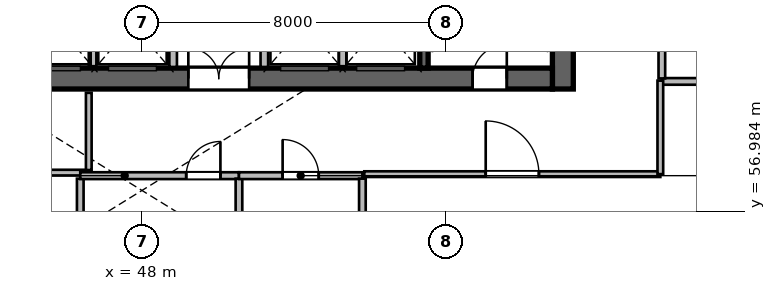
"""IFC4 building model, lengths in metres.
Left out: names, types, materials, properties, quantities, classifications, styles, units other than length and angle.
Written with IfcOpenShell. Run it as: python <this file> out.ifc"""

import sys

from ifc_helpers import new_model, si_unit, direction, frame, frame_2d, origin, place, context, subcontext, project, spatial, rectangle, extrude, source, transform, mapped, element, fill, save


model = new_model("IFC4")
c1 = context("Model", 3, precision=1e-05, world=origin(), true_north=direction((0.0, 1.0)))
c2 = subcontext(c1, "Body", "Model", "MODEL_VIEW")
j1 = project(units=[si_unit("LENGTHUNIT", "METRE"), si_unit("PLANEANGLEUNIT", "RADIAN")], contexts=[c1])
p1 = place(None, origin())
s1 = spatial("IfcSite", under=j1, at=p1, CompositionType="ELEMENT")
p2 = place(p1, origin())
s2 = spatial("IfcBuilding", under=s1, at=p2, CompositionType="ELEMENT")
p3 = place(p2, frame((0.0, 0.0, 30.0)))
s3 = spatial("IfcBuildingStorey", under=s2, at=p3, CompositionType="ELEMENT", Elevation=30.0)
m1 = source(origin(), c2, "Body", "SweptSolid", [
    extrude(rectangle(XDim=12.0, YDim=0.55, at=frame_2d((6.0, 0.0))), origin(), (0.0, 0.0, 1.0), 5.4),
])
p4 = place(p3, frame((59.075, 60.2, 0.0), z_axis=(0.0, 0.0, 1.0), x_axis=(0.0, 1.0, 0.0)))
e1 = element("IfcWall", 1, at=p4, inside=s3, PredefinedType="SHEAR", context=c2, shape_type="MappedRepresentation", body=[
    mapped(m1, transform((0.0, 0.0, 0.0), scale=1.0)),
])
m2 = source(origin(), c2, "Body", "SweptSolid", [
    extrude(rectangle(XDim=21.6, YDim=0.55, at=frame_2d((10.8, 0.0))), origin(), (0.0, 0.0, 1.0), 5.4),
])
p5 = place(p3, frame((37.2, 60.475, 0.0), z_axis=(0.0, 0.0, 1.0), x_axis=(1.0, 0.0, 0.0)))
e2 = element("IfcWall", 2, at=p5, inside=s3, PredefinedType="SHEAR", context=c2, shape_type="MappedRepresentation", body=[
    mapped(m2, transform((0.0, 0.0, 0.0), scale=1.0)),
])
p6 = place(p5, frame((1.1, 0.0, 0.0)))
e3 = element("IfcOpeningElement", 3, at=p6, cuts=e2, PredefinedType="OPENING", context=c2, shape_type="SweptSolid", body=[
    extrude(rectangle(XDim=1.15, YDim=2.15, at=frame_2d((0.575, 1.075))), frame((0.0, 0.285, 0.0), z_axis=(0.0, -1.0, 0.0), x_axis=(1.0, 0.0, 0.0)), (0.0, 0.0, 1.0), 0.57),
])
p7 = place(p5, frame((19.5, 0.0, 0.0)))
e4 = element("IfcOpeningElement", 4, at=p7, cuts=e2, PredefinedType="OPENING", context=c2, shape_type="SweptSolid", body=[
    extrude(rectangle(XDim=0.9, YDim=2.1, at=frame_2d((0.45, 1.05))), frame((0.0, 0.285, 0.0), z_axis=(0.0, -1.0, 0.0), x_axis=(1.0, 0.0, 0.0)), (0.0, 0.0, 1.0), 0.57),
])
p8 = place(p5, frame((12.02, 0.0, 0.0)))
e5 = element("IfcOpeningElement", 5, at=p8, cuts=e2, PredefinedType="OPENING", context=c2, shape_type="SweptSolid", body=[
    extrude(rectangle(XDim=1.6, YDim=2.15, at=frame_2d((0.8, 1.075))), frame((0.0, 0.285, 0.0), z_axis=(0.0, -1.0, 0.0), x_axis=(1.0, 0.0, 0.0)), (0.0, 0.0, 1.0), 0.57),
])
m3 = source(origin(), c2, "Body", "SweptSolid", [
    extrude(rectangle(XDim=10.9, YDim=0.22, at=frame_2d((5.45, 0.0))), origin(), (0.0, 0.0, 1.0), 5.4),
])
p9 = place(p3, frame((55.42, 60.75, 0.0), z_axis=(0.0, 0.0, 1.0), x_axis=(0.0, 1.0, 0.0)))
e6 = element("IfcWall", 6, at=p9, inside=s3, PredefinedType="SHEAR", context=c2, shape_type="MappedRepresentation", body=[
    mapped(m3, transform((0.0, 0.0, 0.0), scale=1.0)),
])
p10 = place(p9, frame((9.495, 0.0, 0.0)))
e7 = element("IfcOpeningElement", 7, at=p10, cuts=e6, PredefinedType="OPENING", context=c2, shape_type="SweptSolid", body=[
    extrude(rectangle(XDim=1.15, YDim=2.15, at=frame_2d((0.575, 1.075))), frame((0.0, 0.12, 0.0), z_axis=(0.0, -1.0, 0.0), x_axis=(1.0, 0.0, 0.0)), (0.0, 0.0, 1.0), 0.24),
])
m4 = source(origin(), c2, "Body", "SweptSolid", [
    extrude(rectangle(XDim=2.24, YDim=0.2, at=frame_2d((1.12, 0.0))), origin(), (0.0, 0.0, 1.0), 5.16),
])
for number, where, z_axis, x_axis in (
    (8, (48.82, 60.78, 0.0), (0.0, 0.0, 1.0), (0.0, 1.0, 0.0)),
    (9, (51.22, 60.78, 0.0), (0.0, 0.0, 1.0), (0.0, 1.0, 0.0)),
):
    element("IfcWall", number, at=place(p3, frame(where, z_axis=z_axis, x_axis=x_axis)), inside=s3, PredefinedType="SOLIDWALL", context=c2, shape_type="MappedRepresentation", body=[
        mapped(m4, transform((0.0, 0.0, 0.0), scale=1.0)),
    ])
m5 = source(origin(), c2, "Body", "SweptSolid", [
    extrude(rectangle(XDim=2.2, YDim=0.2, at=frame_2d((1.1, 0.0))), origin(), (0.0, 0.0, 1.0), 5.16),
])
for number, where, z_axis, x_axis in (
    (10, (46.7, 60.8, 0.0), (0.0, 0.0, 1.0), (0.0, 1.0, 0.0)),
    (11, (53.28, 60.8, 0.0), (0.0, 0.0, 1.0), (0.0, 1.0, 0.0)),
):
    element("IfcWall", number, at=place(p3, frame(where, z_axis=z_axis, x_axis=x_axis)), inside=s3, PredefinedType="SOLIDWALL", context=c2, shape_type="MappedRepresentation", body=[
        mapped(m5, transform((0.0, 0.0, 0.0), scale=1.0)),
    ])
m6 = source(origin(), c2, "Body", "SweptSolid", [
    extrude(rectangle(XDim=5.4, YDim=0.15, at=frame_2d((2.7, 0.0))), origin(), (0.0, 0.0, 1.0), 4.591),
])
p11 = place(p3, frame((41.2, 58.0, 0.0), z_axis=(0.0, 0.0, 1.0), x_axis=(1.0, 0.0, 0.0)))
e12 = element("IfcWall", 12, at=p11, inside=s3, PredefinedType="PARTITIONING", context=c2, shape_type="MappedRepresentation", body=[
    mapped(m6, transform((0.0, 0.0, 0.0), scale=1.0)),
])
p12 = place(p11, frame((2.25, 0.0, 0.0)))
e13 = element("IfcOpeningElement", 13, at=p12, cuts=e12, PredefinedType="OPENING", context=c2, shape_type="SweptSolid", body=[
    extrude(rectangle(XDim=0.9, YDim=2.08, at=frame_2d((0.45, 1.04))), frame((0.0, 0.085, 0.0), z_axis=(0.0, -1.0, 0.0), x_axis=(1.0, 0.0, 0.0)), (0.0, 0.0, 1.0), 0.17),
])
m7 = source(origin(), c2, "Body", "SweptSolid", [
    extrude(rectangle(XDim=2.033, YDim=0.15, at=frame_2d((1.016, 0.0))), origin(), (0.0, 0.0, 1.0), 5.16),
])
p13 = place(p3, frame((46.6, 58.067, 0.0), z_axis=(0.0, 0.0, 1.0), x_axis=(0.0, 1.0, 0.0)))
e14 = element("IfcWall", 14, at=p13, inside=s3, PredefinedType="PARTITIONING", context=c2, shape_type="MappedRepresentation", body=[
    mapped(m7, transform((0.0, 0.0, 0.0), scale=1.0)),
])
m8 = source(origin(), c2, "Body", "SweptSolid", [
    extrude(rectangle(XDim=3.763, YDim=0.175, at=frame_2d((1.881, 0.0))), origin(), (0.0, 0.0, 1.0), 5.16),
])
p14 = place(p3, frame((46.376, 54.079, 0.0), z_axis=(0.0, 0.0, 1.0), x_axis=(0.0, 1.0, 0.0)))
e15 = element("IfcWall", 15, at=p14, inside=s3, PredefinedType="PARTITIONING", context=c2, shape_type="MappedRepresentation", body=[
    mapped(m8, transform((0.0, 0.0, 0.0), scale=1.0)),
])
m9 = source(origin(), c2, "Body", "SweptSolid", [
    extrude(rectangle(XDim=4.176, YDim=0.18, at=frame_2d((2.088, 0.0))), origin(), (0.0, 0.0, 1.0), 5.16),
])
p15 = place(p3, frame((46.376, 57.92, 0.0), z_axis=(0.0, 0.0, 1.0), x_axis=(1.0, 0.0, 0.0)))
e16 = element("IfcWall", 16, at=p15, inside=s3, PredefinedType="PLUMBINGWALL", context=c2, shape_type="MappedRepresentation", body=[
    mapped(m9, transform((0.0, 0.0, 0.0), scale=1.0)),
])
p16 = place(p15, frame((2.788, 0.0, 0.0)))
e17 = element("IfcOpeningElement", 17, at=p16, cuts=e16, PredefinedType="OPENING", context=c2, shape_type="SweptSolid", body=[
    extrude(rectangle(XDim=0.9, YDim=2.08, at=frame_2d((0.45, 1.04))), frame((0.0, 0.1, 0.0), z_axis=(0.0, -1.0, 0.0), x_axis=(1.0, 0.0, 0.0)), (0.0, 0.0, 1.0), 0.2),
])
p17 = place(p3, frame((50.552, 54.079, 0.0), z_axis=(0.0, 0.0, 1.0), x_axis=(0.0, 1.0, 0.0)))
e18 = element("IfcWall", 18, at=p17, inside=s3, PredefinedType="PARTITIONING", context=c2, shape_type="MappedRepresentation", body=[
    mapped(m8, transform((0.0, 0.0, 0.0), scale=1.0)),
])
m10 = source(origin(), c2, "Body", "SweptSolid", [
    extrude(rectangle(XDim=3.248, YDim=0.18, at=frame_2d((1.624, 0.0))), origin(), (0.0, 0.0, 1.0), 5.16),
])
p18 = place(p3, frame((50.552, 57.92, 0.0), z_axis=(0.0, 0.0, 1.0), x_axis=(1.0, 0.0, 0.0)))
e19 = element("IfcWall", 19, at=p18, inside=s3, PredefinedType="PLUMBINGWALL", context=c2, shape_type="MappedRepresentation", body=[
    mapped(m10, transform((0.0, 0.0, 0.0), scale=1.0)),
])
p19 = place(p18, frame((1.149, 0.0, 0.0)))
e20 = element("IfcOpeningElement", 20, at=p19, cuts=e19, PredefinedType="OPENING", context=c2, shape_type="SweptSolid", body=[
    extrude(rectangle(XDim=0.95, YDim=2.12, at=frame_2d((0.475, 1.06))), frame((0.0, 0.1, 0.0), z_axis=(0.0, -1.0, 0.0), x_axis=(1.0, 0.0, 0.0)), (0.0, 0.0, 1.0), 0.2),
])
p20 = place(p3, frame((53.8, 54.079, 0.0), z_axis=(0.0, 0.0, 1.0), x_axis=(0.0, 1.0, 0.0)))
e21 = element("IfcWall", 21, at=p20, inside=s3, PredefinedType="PARTITIONING", context=c2, shape_type="MappedRepresentation", body=[
    mapped(m8, transform((0.0, 0.0, 0.0), scale=1.0)),
])
m11 = source(origin(), c2, "Body", "SweptSolid", [
    extrude(rectangle(XDim=9.82, YDim=0.175, at=frame_2d((4.91, 0.0))), origin(), (0.0, 0.0, 1.0), 5.16),
])
p21 = place(p3, frame((61.68, 60.4, 0.0), z_axis=(0.0, 0.0, 1.0), x_axis=(1.0, 0.0, 0.0)))
e22 = element("IfcWall", 22, at=p21, inside=s3, PredefinedType="PARTITIONING", context=c2, shape_type="MappedRepresentation", body=[
    mapped(m11, transform((0.0, 0.0, 0.0), scale=1.0)),
])
m12 = source(origin(), c2, "Body", "SweptSolid", [
    extrude(rectangle(XDim=7.443, YDim=0.175, at=frame_2d((3.721, 0.0))), origin(), (0.0, 0.0, 1.0), 5.16),
])
p22 = place(p3, frame((61.68, 60.479, 0.0), z_axis=(0.0, 0.0, 1.0), x_axis=(0.0, 1.0, 0.0)))
e23 = element("IfcWall", 23, at=p22, inside=s3, PredefinedType="PARTITIONING", context=c2, shape_type="MappedRepresentation", body=[
    mapped(m12, transform((0.0, 0.0, 0.0), scale=1.0)),
])
p23 = place(p22, frame((3.121, 0.0, 0.0)))
e24 = element("IfcOpeningElement", 24, at=p23, cuts=e23, PredefinedType="OPENING", context=c2, shape_type="SweptSolid", body=[
    extrude(rectangle(XDim=1.2, YDim=2.15, at=frame_2d((0.6, 1.075))), frame((0.0, 0.098, 0.0), z_axis=(0.0, -1.0, 0.0), x_axis=(1.0, 0.0, 0.0)), (0.0, 0.0, 1.0), 0.195),
])
m13 = source(origin(), c2, "Body", "SweptSolid", [
    extrude(rectangle(XDim=7.79, YDim=0.15, at=frame_2d((3.895, 0.0))), origin(), (0.0, 0.0, 1.0), 4.591),
])
p24 = place(p3, frame((53.85, 57.96, 0.0), z_axis=(0.0, 0.0, 1.0), x_axis=(1.0, 0.0, 0.0)))
e25 = element("IfcWall", 25, at=p24, inside=s3, PredefinedType="PARTITIONING", context=c2, shape_type="MappedRepresentation", body=[
    mapped(m13, transform((0.0, 0.0, 0.0), scale=1.0)),
])
p25 = place(p24, frame((3.195, 0.0, 0.0)))
e26 = element("IfcOpeningElement", 26, at=p25, cuts=e25, PredefinedType="OPENING", context=c2, shape_type="SweptSolid", body=[
    extrude(rectangle(XDim=1.4, YDim=2.15, at=frame_2d((0.7, 1.075))), frame((0.0, 0.085, 0.0), z_axis=(0.0, -1.0, 0.0), x_axis=(1.0, 0.0, 0.0)), (0.0, 0.0, 1.0), 0.17),
])
m14 = source(origin(), c2, "Body", "SweptSolid", [
    extrude(rectangle(XDim=2.46, YDim=0.15, at=frame_2d((1.23, 0.0))), origin(), (0.0, 0.0, 1.0), 5.16),
])
p26 = place(p3, frame((61.64, 57.96, 0.0), z_axis=(0.0, 0.0, 1.0), x_axis=(0.0, 1.0, 0.0)))
e27 = element("IfcWall", 27, at=p26, inside=s3, PredefinedType="PARTITIONING", context=c2, shape_type="MappedRepresentation", body=[
    mapped(m14, transform((0.0, 0.0, 0.0), scale=1.0)),
])
m15 = source(origin(), c2, "Body", "SweptSolid", [
    extrude(rectangle(XDim=0.9, YDim=2.1, at=frame_2d((0.45, 1.05))), frame((0.0, 0.025, 0.0), z_axis=(0.0, -1.0, 0.0), x_axis=(1.0, 0.0, 0.0)), (0.0, 0.0, 1.0), 0.05),
])
p27 = place(p7, origin())
e28 = element("IfcDoor", 28, at=p27, inside=s3, OperationType="SINGLE_SWING_RIGHT", PredefinedType="DOOR", context=c2, shape_type="MappedRepresentation", body=[
    mapped(m15, transform((0.0, 0.0, 0.0), scale=1.0)),
])
fill(e4, e28)
m16 = source(origin(), c2, "Body", "SweptSolid", [
    extrude(rectangle(XDim=1.6, YDim=2.15, at=frame_2d((0.8, 1.075))), frame((0.0, 0.025, 0.0), z_axis=(0.0, -1.0, 0.0), x_axis=(1.0, 0.0, 0.0)), (0.0, 0.0, 1.0), 0.05),
])
p28 = place(p8, origin())
e29 = element("IfcDoor", 29, at=p28, inside=s3, OperationType="DOUBLE_DOOR_SINGLE_SWING", PredefinedType="DOOR", context=c2, shape_type="MappedRepresentation", body=[
    mapped(m16, transform((0.0, 0.0, 0.0), scale=1.0)),
])
fill(e5, e29)
m17 = source(origin(), c2, "Body", "SweptSolid", [
    extrude(rectangle(XDim=0.9, YDim=2.08, at=frame_2d((0.45, 1.04))), frame((0.0, 0.025, 0.0), z_axis=(0.0, -1.0, 0.0), x_axis=(1.0, 0.0, 0.0)), (0.0, 0.0, 1.0), 0.05),
])
p29 = place(p16, origin())
e30 = element("IfcDoor", 30, at=p29, inside=s3, OperationType="SINGLE_SWING_RIGHT", PredefinedType="DOOR", context=c2, shape_type="MappedRepresentation", body=[
    mapped(m17, transform((0.0, 0.0, 0.0), scale=1.0)),
])
fill(e17, e30)
m18 = source(origin(), c2, "Body", "SweptSolid", [
    extrude(rectangle(XDim=0.95, YDim=2.12, at=frame_2d((0.475, 1.06))), frame((0.0, 0.025, 0.0), z_axis=(0.0, -1.0, 0.0), x_axis=(1.0, 0.0, 0.0)), (0.0, 0.0, 1.0), 0.05),
])
p30 = place(p19, origin())
e31 = element("IfcDoor", 31, at=p30, inside=s3, OperationType="SINGLE_SWING_LEFT", PredefinedType="DOOR", context=c2, shape_type="MappedRepresentation", body=[
    mapped(m18, transform((0.0, 0.0, 0.0), scale=1.0)),
])
fill(e20, e31)
m19 = source(origin(), c2, "Body", "SweptSolid", [
    extrude(rectangle(XDim=1.4, YDim=2.15, at=frame_2d((0.7, 1.075))), frame((0.0, 0.025, 0.0), z_axis=(0.0, -1.0, 0.0), x_axis=(1.0, 0.0, 0.0)), (0.0, 0.0, 1.0), 0.05),
])
p31 = place(p25, origin())
e32 = element("IfcDoor", 32, at=p31, inside=s3, OperationType="SINGLE_SWING_LEFT", PredefinedType="DOOR", context=c2, shape_type="MappedRepresentation", body=[
    mapped(m19, transform((0.0, 0.0, 0.0), scale=1.0)),
])
fill(e26, e32)
save(model, sys.argv[1])
